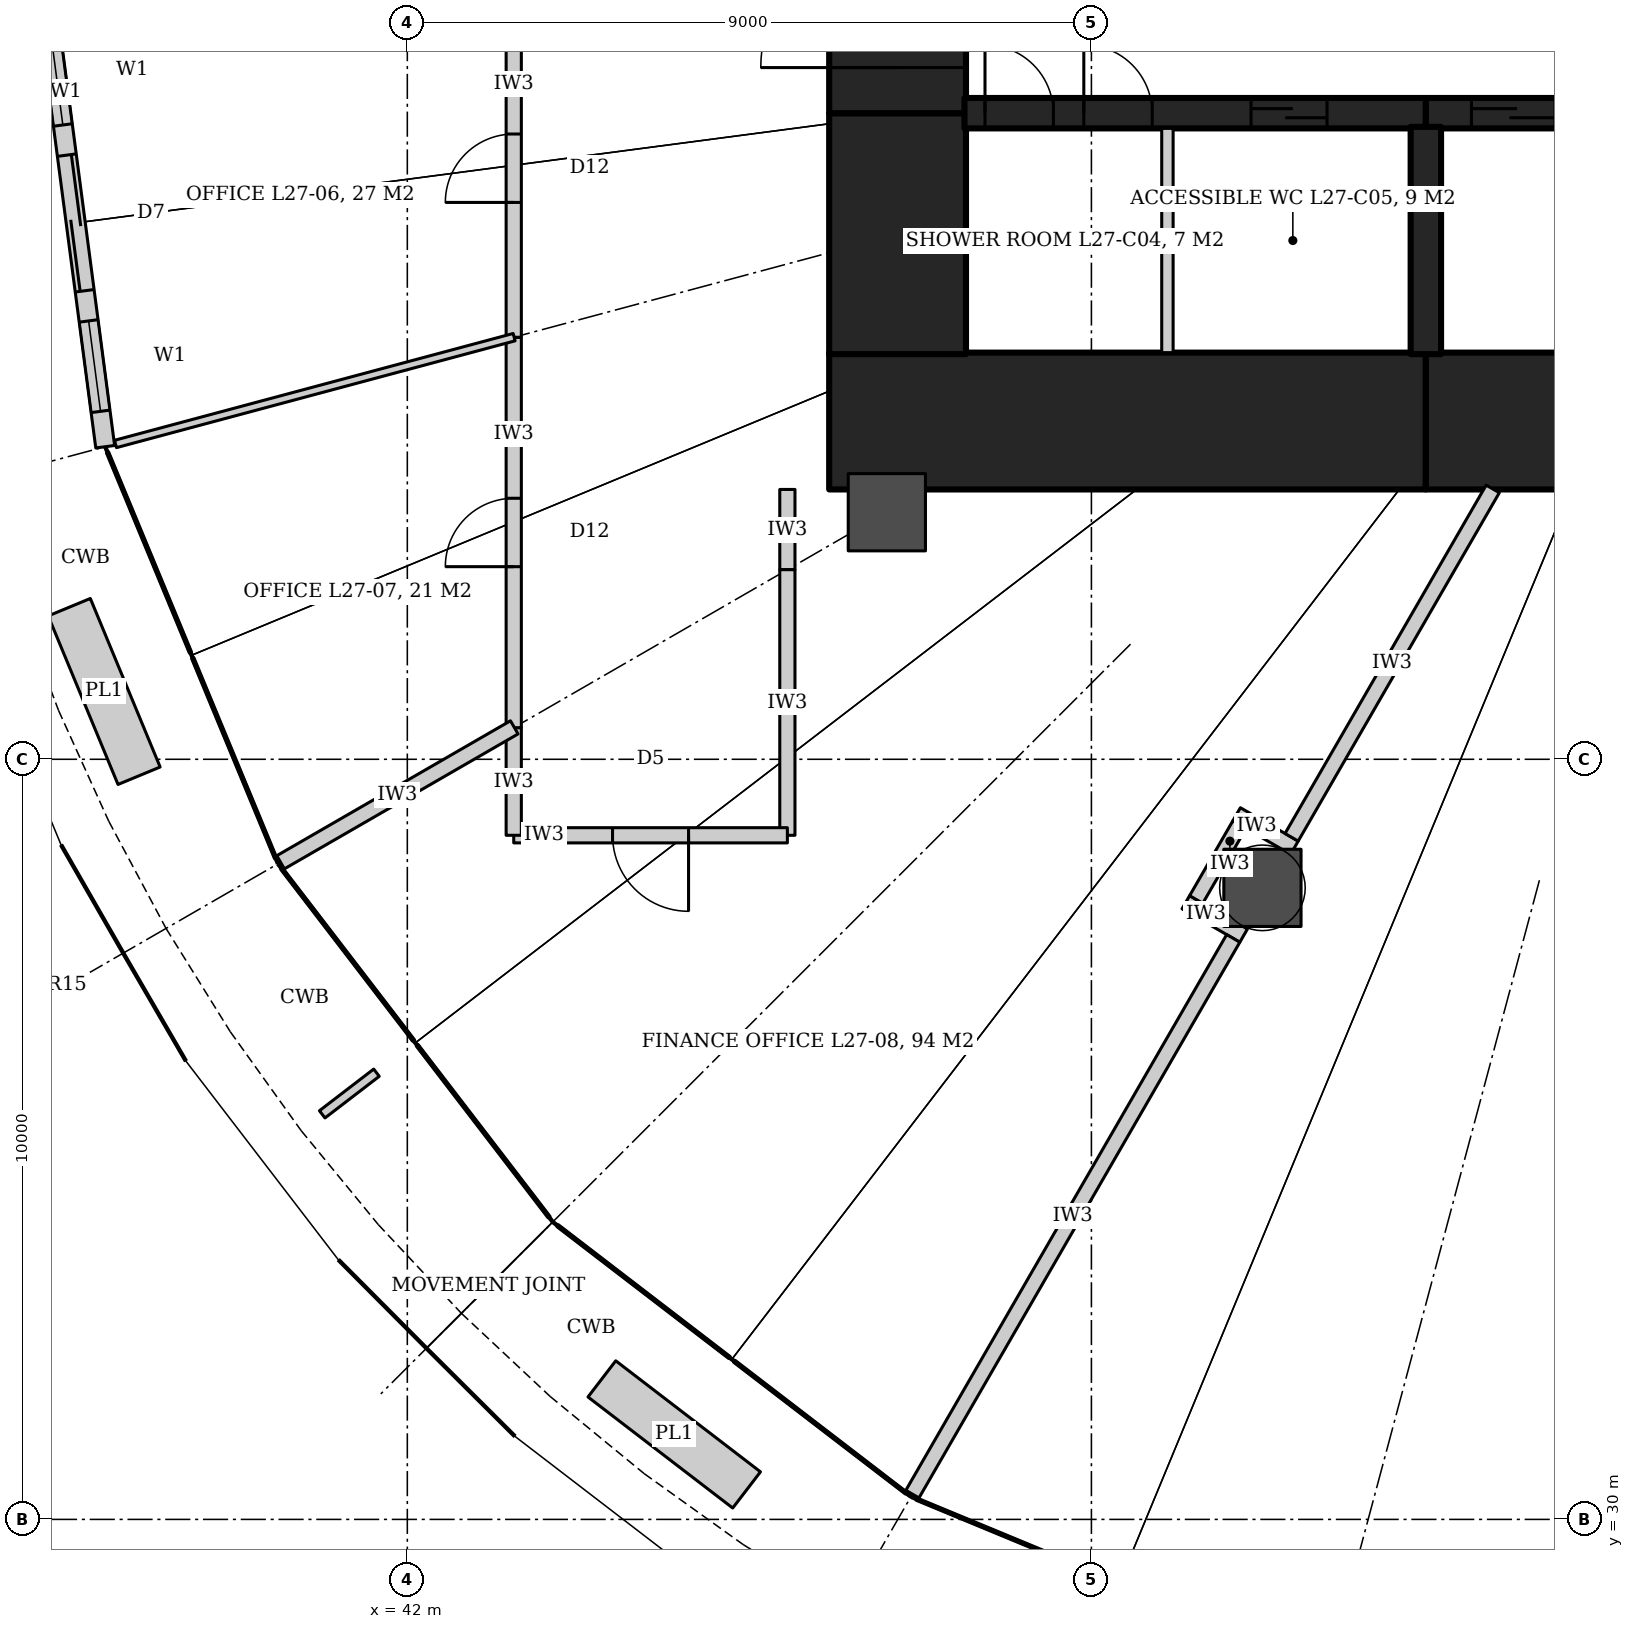
"""IFC4 building model, lengths in metres.
Left out: names, types, materials, properties, quantities, classifications, styles, units other than length and angle.
Written with IfcOpenShell. Run it as: python <this file> out.ifc"""

import sys

from ifc_helpers import new_model, si_unit, direction, frame, frame_2d, origin, origin_2d, place, context, subcontext, project, spatial, rectangle, hollow_circle, extrude, element, fill, save


model = new_model("IFC4")
c1 = context("Model", 3, precision=1e-05, world=origin(), true_north=direction((0.0, 1.0)))
c2 = subcontext(c1, "Body", "Model", "MODEL_VIEW")
j1 = project(units=[si_unit("LENGTHUNIT", "METRE"), si_unit("PLANEANGLEUNIT", "RADIAN")], contexts=[c1])
p1 = place(None, origin())
s1 = spatial("IfcSite", under=j1, at=p1, CompositionType="ELEMENT")
p2 = place(p1, origin())
s2 = spatial("IfcBuilding", under=s1, at=p2, CompositionType="ELEMENT")
p3 = place(p2, frame((0.0, 0.0, 122.6)))
s3 = spatial("IfcBuildingStorey", under=s2, at=p3, CompositionType="ELEMENT", Elevation=122.6)
p4 = place(p3, frame((47.55, 44.45, 0.0), z_axis=(0.0, 0.0, 1.0), x_axis=(1.0, 0.0, 0.0)))
e1 = element("IfcWall", 1, at=p4, inside=s3, PredefinedType="SHEAR", context=c2, shape_type="SweptSolid", body=[
    extrude(rectangle(XDim=7.85, YDim=1.8, at=frame_2d((3.925, 0.0))), origin(), (0.0, 0.0, 1.0), 4.2),
])
p5 = place(p3, frame((55.4, 44.45, 0.0), z_axis=(0.0, 0.0, 1.0), x_axis=(1.0, 0.0, 0.0)))
e2 = element("IfcWall", 2, at=p5, inside=s3, PredefinedType="SHEAR", context=c2, shape_type="SweptSolid", body=[
    extrude(rectangle(XDim=9.2, YDim=1.8, at=frame_2d((4.6, 0.0))), origin(), (0.0, 0.0, 1.0), 4.2),
])
p6 = place(p3, frame((48.45, 45.33, 0.0), z_axis=(0.0, 0.0, 1.0), x_axis=(0.0, 1.0, 0.0)))
e3 = element("IfcWall", 3, at=p6, inside=s3, PredefinedType="SHEAR", context=c2, shape_type="SweptSolid", body=[
    extrude(rectangle(XDim=3.17, YDim=1.8, at=frame_2d((1.585, 0.0))), origin(), (0.0, 0.0, 1.0), 4.2),
])
p7 = place(p3, frame((48.45, 48.5, 0.0), z_axis=(0.0, 0.0, 1.0), x_axis=(0.0, 1.0, 0.0)))
e4 = element("IfcWall", 4, at=p7, inside=s3, PredefinedType="SHEAR", context=c2, shape_type="SweptSolid", body=[
    extrude(rectangle(XDim=3.0, YDim=1.8, at=frame_2d((1.5, 0.0))), origin(), (0.0, 0.0, 1.0), 4.2),
])
p8 = place(p7, frame((0.6, 0.0, 0.0)))
e5 = element("IfcOpeningElement", 5, at=p8, cuts=e4, PredefinedType="OPENING", context=c2, shape_type="SweptSolid", body=[
    extrude(rectangle(XDim=1.8, YDim=2.1, at=frame_2d((0.9, 1.05))), frame((0.0, 0.91, 0.0), z_axis=(0.0, -1.0, 0.0), x_axis=(1.0, 0.0, 0.0)), (0.0, 0.0, 1.0), 1.82),
])
p9 = place(p3, frame((49.33, 48.5, 0.0), z_axis=(0.0, 0.0, 1.0), x_axis=(1.0, 0.0, 0.0)))
e6 = element("IfcWall", 6, at=p9, inside=s3, PredefinedType="SHEAR", context=c2, shape_type="SweptSolid", body=[
    extrude(rectangle(XDim=6.07, YDim=0.4, at=frame_2d((3.035, 0.0))), origin(), (0.0, 0.0, 1.0), 4.2),
])
p10 = place(p9, frame((0.27, 0.0, 0.0)))
e7 = element("IfcOpeningElement", 7, at=p10, cuts=e6, PredefinedType="OPENING", context=c2, shape_type="SweptSolid", body=[
    extrude(rectangle(XDim=0.9, YDim=2.1, at=frame_2d((0.45, 1.05))), frame((0.0, 0.21, 0.0), z_axis=(0.0, -1.0, 0.0), x_axis=(1.0, 0.0, 0.0)), (0.0, 0.0, 1.0), 0.42),
])
p11 = place(p9, frame((1.57, 0.0, 0.0)))
e8 = element("IfcOpeningElement", 8, at=p11, cuts=e6, PredefinedType="OPENING", context=c2, shape_type="SweptSolid", body=[
    extrude(rectangle(XDim=0.9, YDim=2.1, at=frame_2d((0.45, 1.05))), frame((0.0, 0.21, 0.0), z_axis=(0.0, -1.0, 0.0), x_axis=(1.0, 0.0, 0.0)), (0.0, 0.0, 1.0), 0.42),
])
p12 = place(p9, frame((3.77, 0.0, 0.0)))
e9 = element("IfcOpeningElement", 9, at=p12, cuts=e6, PredefinedType="OPENING", context=c2, shape_type="SweptSolid", body=[
    extrude(rectangle(XDim=1.0, YDim=2.1, at=frame_2d((0.5, 1.05))), frame((0.0, 0.21, 0.0), z_axis=(0.0, -1.0, 0.0), x_axis=(1.0, 0.0, 0.0)), (0.0, 0.0, 1.0), 0.42),
])
p13 = place(p3, frame((55.4, 48.5, 0.0), z_axis=(0.0, 0.0, 1.0), x_axis=(1.0, 0.0, 0.0)))
e10 = element("IfcWall", 10, at=p13, inside=s3, PredefinedType="SHEAR", context=c2, shape_type="SweptSolid", body=[
    extrude(rectangle(XDim=9.2, YDim=0.4, at=frame_2d((4.6, 0.0))), origin(), (0.0, 0.0, 1.0), 4.2),
])
p14 = place(p13, frame((0.6, 0.0, 0.0)))
e11 = element("IfcOpeningElement", 11, at=p14, cuts=e10, PredefinedType="OPENING", context=c2, shape_type="SweptSolid", body=[
    extrude(rectangle(XDim=1.1, YDim=2.1, at=frame_2d((0.55, 1.05))), frame((0.0, 0.21, 0.0), z_axis=(0.0, -1.0, 0.0), x_axis=(1.0, 0.0, 0.0)), (0.0, 0.0, 1.0), 0.42),
])
p15 = place(p13, frame((2.9, 0.0, 0.0)))
e12 = element("IfcOpeningElement", 12, at=p15, cuts=e10, PredefinedType="OPENING", context=c2, shape_type="SweptSolid", body=[
    extrude(rectangle(XDim=1.1, YDim=2.1, at=frame_2d((0.55, 1.05))), frame((0.0, 0.21, 0.0), z_axis=(0.0, -1.0, 0.0), x_axis=(1.0, 0.0, 0.0)), (0.0, 0.0, 1.0), 0.42),
])
p16 = place(p13, frame((5.2, 0.0, 0.0)))
e13 = element("IfcOpeningElement", 13, at=p16, cuts=e10, PredefinedType="OPENING", context=c2, shape_type="SweptSolid", body=[
    extrude(rectangle(XDim=1.1, YDim=2.1, at=frame_2d((0.55, 1.05))), frame((0.0, 0.21, 0.0), z_axis=(0.0, -1.0, 0.0), x_axis=(1.0, 0.0, 0.0)), (0.0, 0.0, 1.0), 0.42),
])
p17 = place(p13, frame((7.5, 0.0, 0.0)))
e14 = element("IfcOpeningElement", 14, at=p17, cuts=e10, PredefinedType="OPENING", context=c2, shape_type="SweptSolid", body=[
    extrude(rectangle(XDim=1.1, YDim=2.1, at=frame_2d((0.55, 1.05))), frame((0.0, 0.21, 0.0), z_axis=(0.0, -1.0, 0.0), x_axis=(1.0, 0.0, 0.0)), (0.0, 0.0, 1.0), 0.42),
])
p18 = place(p3, frame((55.4, 48.32, 0.0), z_axis=(0.0, 0.0, 1.0), x_axis=(0.0, -1.0, 0.0)))
e15 = element("IfcWall", 15, at=p18, inside=s3, PredefinedType="SHEAR", context=c2, shape_type="SweptSolid", body=[
    extrude(rectangle(XDim=2.99, YDim=0.4, at=frame_2d((1.495, 0.0))), origin(), (0.0, 0.0, 1.0), 4.2),
])
for number, where, z_axis, x_axis in (
    (16, (48.309, 43.25, 0.0), (0.0, 0.0, 1.0), (1.0, 0.0, 0.0)),
    (17, (53.25, 38.309, 0.0), (0.0, 0.0, 1.0), (1.0, 0.0, 0.0)),
):
    element("IfcColumn", number, at=place(p3, frame(where, z_axis=z_axis, x_axis=x_axis)), inside=s3, PredefinedType="COLUMN", context=c2, shape_type="SweptSolid", body=[
        extrude(hollow_circle(Radius=0.508, WallThickness=0.05, at=origin_2d()), origin(), (0.0, 0.0, 1.0), 4.2),
    ])
p19 = place(p3, frame((47.0, 43.55, 0.0), z_axis=(0.0, 0.0, 1.0), x_axis=(0.0, -1.0, 0.0)))
e18 = element("IfcWall", 18, at=p19, inside=s3, PredefinedType="PARTITIONING", context=c2, shape_type="SweptSolid", body=[
    extrude(rectangle(XDim=1.056, YDim=0.2, at=frame_2d((0.528, 0.0))), origin(), (0.0, 0.0, 1.0), 3.04),
])
p20 = place(p3, frame((47.0, 42.494, 0.0), z_axis=(0.0, 0.0, 1.0), x_axis=(0.0, -1.0, 0.0)))
e19 = element("IfcWall", 19, at=p20, inside=s3, PredefinedType="PARTITIONING", context=c2, shape_type="SweptSolid", body=[
    extrude(rectangle(XDim=3.494, YDim=0.2, at=frame_2d((1.747, 0.0))), origin(), (0.0, 0.0, 1.0), 3.04),
])
p21 = place(p3, frame((47.0, 39.0, 0.0), z_axis=(0.0, 0.0, 1.0), x_axis=(-1.0, 0.0, 0.0)))
e20 = element("IfcWall", 20, at=p21, inside=s3, PredefinedType="PARTITIONING", context=c2, shape_type="SweptSolid", body=[
    extrude(rectangle(XDim=3.6, YDim=0.2, at=frame_2d((1.8, 0.0))), origin(), (0.0, 0.0, 1.0), 3.04),
])
p22 = place(p21, frame((1.3, 0.0, 0.0)))
e21 = element("IfcOpeningElement", 21, at=p22, cuts=e20, PredefinedType="OPENING", context=c2, shape_type="SweptSolid", body=[
    extrude(rectangle(XDim=1.0, YDim=2.1, at=frame_2d((0.5, 1.05))), frame((0.0, 0.11, 0.0), z_axis=(0.0, -1.0, 0.0), x_axis=(1.0, 0.0, 0.0)), (0.0, 0.0, 1.0), 0.22),
])
p23 = place(p3, frame((43.4, 39.0, 0.0), z_axis=(0.0, 0.0, 1.0), x_axis=(0.0, 1.0, 0.0)))
e22 = element("IfcWall", 22, at=p23, inside=s3, PredefinedType="PARTITIONING", context=c2, shape_type="SweptSolid", body=[
    extrude(rectangle(XDim=1.416, YDim=0.2, at=frame_2d((0.708, 0.0))), origin(), (0.0, 0.0, 1.0), 3.04),
])
p24 = place(p3, frame((43.4, 40.416, 0.0), z_axis=(0.0, 0.0, 1.0), x_axis=(0.0, 1.0, 0.0)))
e23 = element("IfcWall", 23, at=p24, inside=s3, PredefinedType="PARTITIONING", context=c2, shape_type="SweptSolid", body=[
    extrude(rectangle(XDim=5.136, YDim=0.2, at=frame_2d((2.568, 0.0))), origin(), (0.0, 0.0, 1.0), 3.04),
])
p25 = place(p24, frame((2.118, 0.0, 0.0)))
e24 = element("IfcOpeningElement", 24, at=p25, cuts=e23, PredefinedType="OPENING", context=c2, shape_type="SweptSolid", body=[
    extrude(rectangle(XDim=0.9, YDim=2.4, at=frame_2d((0.45, 1.2))), frame((0.0, 0.11, 0.0), z_axis=(0.0, -1.0, 0.0), x_axis=(1.0, 0.0, 0.0)), (0.0, 0.0, 1.0), 0.22),
])
p26 = place(p3, frame((43.4, 45.552, 0.0), z_axis=(0.0, 0.0, 1.0), x_axis=(0.0, 1.0, 0.0)))
e25 = element("IfcWall", 25, at=p26, inside=s3, PredefinedType="PARTITIONING", context=c2, shape_type="SweptSolid", body=[
    extrude(rectangle(XDim=4.448, YDim=0.2, at=frame_2d((2.224, 0.0))), origin(), (0.0, 0.0, 1.0), 3.04),
])
p27 = place(p26, frame((1.774, 0.0, 0.0)))
e26 = element("IfcOpeningElement", 26, at=p27, cuts=e25, PredefinedType="OPENING", context=c2, shape_type="SweptSolid", body=[
    extrude(rectangle(XDim=0.9, YDim=2.4, at=frame_2d((0.45, 1.2))), frame((0.0, 0.11, 0.0), z_axis=(0.0, -1.0, 0.0), x_axis=(1.0, 0.0, 0.0)), (0.0, 0.0, 1.0), 0.22),
])
p28 = place(p3, frame((43.406, 45.553, 0.0), z_axis=(0.0, 0.0, 1.0), x_axis=(-0.965932799886, -0.258793017881, 0.0)))
e27 = element("IfcWall", 27, at=p28, inside=s3, PredefinedType="PARTITIONING", context=c2, shape_type="SweptSolid", body=[
    extrude(rectangle(XDim=5.43, YDim=0.1, at=frame_2d((2.715, 0.0))), origin(), (0.0, 0.0, 1.0), 3.04),
])
p29 = place(p3, frame((43.407, 40.42, 0.0), z_axis=(0.0, 0.0, 1.0), x_axis=(-0.8660424351, -0.499970499736, 0.0)))
e28 = element("IfcWall", 28, at=p29, inside=s3, PredefinedType="PARTITIONING", context=c2, shape_type="SweptSolid", body=[
    extrude(rectangle(XDim=3.55, YDim=0.2, at=frame_2d((1.775, 0.0))), origin(), (0.0, 0.0, 1.0), 3.04),
])
for number, where, z_axis, x_axis in (
    (29, (53.671, 38.837, 0.0), (0.0, 0.0, 1.0), (-0.866, 0.5, 0.0)),
    (30, (53.003, 37.68, 0.0), (0.0, 0.0, 1.0), (-0.866, 0.5, 0.0)),
):
    element("IfcWall", number, at=place(p3, frame(where, z_axis=z_axis, x_axis=x_axis)), inside=s3, PredefinedType="PARTITIONING", context=c2, shape_type="SweptSolid", body=[
        extrude(rectangle(XDim=0.878, YDim=0.2, at=frame_2d((0.439, 0.0))), origin(), (0.0, 0.0, 1.0), 3.02),
    ])
p30 = place(p3, frame((52.947, 39.14, 0.0), z_axis=(0.0, 0.0, 1.0), x_axis=(-0.499883687939, -0.866092546171, 0.0)))
e31 = element("IfcWall", 31, at=p30, inside=s3, PredefinedType="PARTITIONING", context=c2, shape_type="SweptSolid", body=[
    extrude(rectangle(XDim=1.136, YDim=0.2, at=frame_2d((0.568, 0.0))), origin(), (0.0, 0.0, 1.0), 3.02),
])
p31 = place(p3, frame((56.28, 43.557, 0.0), z_axis=(0.0, 0.0, 1.0), x_axis=(-0.49999933383, -0.866025788398, 0.0)))
e32 = element("IfcWall", 32, at=p31, inside=s3, PredefinedType="PARTITIONING", context=c2, shape_type="SweptSolid", body=[
    extrude(rectangle(XDim=5.292, YDim=0.2, at=frame_2d((2.646, 0.0))), origin(), (0.0, 0.0, 1.0), 3.04),
])
p32 = place(p3, frame((52.866, 37.644, 0.0), z_axis=(0.0, 0.0, 1.0), x_axis=(-0.49999281717, -0.866029550753, 0.0)))
e33 = element("IfcWall", 33, at=p32, inside=s3, PredefinedType="PARTITIONING", context=c2, shape_type="SweptSolid", body=[
    extrude(rectangle(XDim=8.442, YDim=0.2, at=frame_2d((4.221, 0.0))), origin(), (0.0, 0.0, 1.0), 3.04),
])
p33 = place(p3, frame((37.25, 50.0, 0.0), z_axis=(0.0, 0.0, 1.0), x_axis=(0.130518315254, -0.991445898364, 0.0)))
e34 = element("IfcWall", 34, at=p33, inside=s3, PredefinedType="SOLIDWALL", context=c2, shape_type="SweptSolid", body=[
    extrude(rectangle(XDim=5.939, YDim=0.25, at=frame_2d((2.969, 0.0))), origin(), (0.0, 0.0, 1.0), 4.04),
])
p34 = place(p33, frame((2.07, 0.0, 0.0)))
e35 = element("IfcOpeningElement", 35, at=p34, cuts=e34, PredefinedType="OPENING", context=c2, shape_type="SweptSolid", body=[
    extrude(rectangle(XDim=1.8, YDim=2.4, at=frame_2d((0.9, 1.2))), frame((0.0, 0.135, 0.0), z_axis=(0.0, -1.0, 0.0), x_axis=(1.0, 0.0, 0.0)), (0.0, 0.0, 1.0), 0.27),
])
p35 = place(p33, frame((0.469, 0.0, 0.0)))
e36 = element("IfcOpeningElement", 36, at=p35, cuts=e34, PredefinedType="OPENING", context=c2, shape_type="SweptSolid", body=[
    extrude(rectangle(XDim=1.2, YDim=2.4, at=frame_2d((0.6, 1.2))), frame((0.0, 0.135, 0.0), z_axis=(0.0, -1.0, 0.0), x_axis=(1.0, 0.0, 0.0)), (0.0, 0.0, 1.0), 0.27),
])
p36 = place(p33, frame((4.27, 0.0, 0.0)))
e37 = element("IfcOpeningElement", 37, at=p36, cuts=e34, PredefinedType="OPENING", context=c2, shape_type="SweptSolid", body=[
    extrude(rectangle(XDim=1.2, YDim=2.4, at=frame_2d((0.6, 1.2))), frame((0.0, 0.135, 0.0), z_axis=(0.0, -1.0, 0.0), x_axis=(1.0, 0.0, 0.0)), (0.0, 0.0, 1.0), 0.27),
])
p37 = place(p3, frame((52.0, 45.35, 0.0), z_axis=(0.0, 0.0, 1.0), x_axis=(0.0, 1.0, 0.0)))
e38 = element("IfcWall", 38, at=p37, inside=s3, PredefinedType="PARTITIONING", context=c2, shape_type="SweptSolid", body=[
    extrude(rectangle(XDim=2.95, YDim=0.15, at=frame_2d((1.475, 0.0))), origin(), (0.0, 0.0, 1.0), 4.04),
])
p38 = place(p27, origin())
e39 = element("IfcDoor", 39, at=p38, inside=s3, OperationType="SINGLE_SWING_LEFT", PredefinedType="DOOR", context=c2, shape_type="SweptSolid", body=[
    extrude(rectangle(XDim=0.9, YDim=2.4, at=frame_2d((0.45, 1.2))), frame((0.0, 0.025, 0.0), z_axis=(0.0, -1.0, 0.0), x_axis=(1.0, 0.0, 0.0)), (0.0, 0.0, 1.0), 0.05),
])
fill(e26, e39)
p39 = place(p25, origin())
e40 = element("IfcDoor", 40, at=p39, inside=s3, OperationType="SINGLE_SWING_LEFT", PredefinedType="DOOR", context=c2, shape_type="SweptSolid", body=[
    extrude(rectangle(XDim=0.9, YDim=2.4, at=frame_2d((0.45, 1.2))), frame((0.0, 0.025, 0.0), z_axis=(0.0, -1.0, 0.0), x_axis=(1.0, 0.0, 0.0)), (0.0, 0.0, 1.0), 0.05),
])
fill(e24, e40)
p40 = place(p22, origin())
e41 = element("IfcDoor", 41, at=p40, inside=s3, OperationType="SINGLE_SWING_LEFT", PredefinedType="DOOR", context=c2, shape_type="SweptSolid", body=[
    extrude(rectangle(XDim=1.0, YDim=2.1, at=frame_2d((0.5, 1.05))), frame((0.0, 0.025, 0.0), z_axis=(0.0, -1.0, 0.0), x_axis=(1.0, 0.0, 0.0)), (0.0, 0.0, 1.0), 0.05),
])
fill(e21, e41)
p41 = place(p34, origin())
e42 = element("IfcDoor", 42, at=p41, inside=s3, OperationType="DOUBLE_DOOR_SLIDING", PredefinedType="DOOR", context=c2, shape_type="SweptSolid", body=[
    extrude(rectangle(XDim=1.8, YDim=2.4, at=frame_2d((0.9, 1.2))), frame((0.0, 0.025, 0.0), z_axis=(0.0, -1.0, 0.0), x_axis=(1.0, 0.0, 0.0)), (0.0, 0.0, 1.0), 0.05),
])
fill(e35, e42)
p42 = place(p35, origin())
e43 = element("IfcWindow", 43, at=p42, inside=s3, PartitioningType="SINGLE_PANEL", PredefinedType="WINDOW", context=c2, shape_type="SweptSolid", body=[
    extrude(rectangle(XDim=1.2, YDim=2.4, at=frame_2d((0.6, 1.2))), frame((0.0, 0.03, 0.0), z_axis=(0.0, -1.0, 0.0), x_axis=(1.0, 0.0, 0.0)), (0.0, 0.0, 1.0), 0.06),
])
fill(e36, e43)
p43 = place(p36, origin())
e44 = element("IfcWindow", 44, at=p43, inside=s3, PartitioningType="SINGLE_PANEL", PredefinedType="WINDOW", context=c2, shape_type="SweptSolid", body=[
    extrude(rectangle(XDim=1.2, YDim=2.4, at=frame_2d((0.6, 1.2))), frame((0.0, 0.03, 0.0), z_axis=(0.0, -1.0, 0.0), x_axis=(1.0, 0.0, 0.0)), (0.0, 0.0, 1.0), 0.06),
])
fill(e37, e44)
p44 = place(p14, origin())
e45 = element("IfcDoor", 45, at=p44, inside=s3, OperationType="SLIDING_TO_LEFT", PredefinedType="DOOR", context=c2, shape_type="SweptSolid", body=[
    extrude(rectangle(XDim=1.1, YDim=2.1, at=frame_2d((0.55, 1.05))), frame((0.0, 0.025, 0.0), z_axis=(0.0, -1.0, 0.0), x_axis=(1.0, 0.0, 0.0)), (0.0, 0.0, 1.0), 0.05),
])
fill(e11, e45)
p45 = place(p10, origin())
e46 = element("IfcDoor", 46, at=p45, inside=s3, OperationType="SINGLE_SWING_RIGHT", PredefinedType="DOOR", context=c2, shape_type="SweptSolid", body=[
    extrude(rectangle(XDim=0.9, YDim=2.1, at=frame_2d((0.45, 1.05))), frame((0.0, 0.025, 0.0), z_axis=(0.0, -1.0, 0.0), x_axis=(1.0, 0.0, 0.0)), (0.0, 0.0, 1.0), 0.05),
])
fill(e7, e46)
p46 = place(p11, origin())
e47 = element("IfcDoor", 47, at=p46, inside=s3, OperationType="SINGLE_SWING_RIGHT", PredefinedType="DOOR", context=c2, shape_type="SweptSolid", body=[
    extrude(rectangle(XDim=0.9, YDim=2.1, at=frame_2d((0.45, 1.05))), frame((0.0, 0.025, 0.0), z_axis=(0.0, -1.0, 0.0), x_axis=(1.0, 0.0, 0.0)), (0.0, 0.0, 1.0), 0.05),
])
fill(e8, e47)
p47 = place(p12, origin())
e48 = element("IfcDoor", 48, at=p47, inside=s3, OperationType="SLIDING_TO_LEFT", PredefinedType="DOOR", context=c2, shape_type="SweptSolid", body=[
    extrude(rectangle(XDim=1.0, YDim=2.1, at=frame_2d((0.5, 1.05))), frame((0.0, 0.025, 0.0), z_axis=(0.0, -1.0, 0.0), x_axis=(1.0, 0.0, 0.0)), (0.0, 0.0, 1.0), 0.05),
])
fill(e9, e48)
p48 = place(p8, origin())
e49 = element("IfcDoor", 49, at=p48, inside=s3, OperationType="DOUBLE_DOOR_DOUBLE_SWING", PredefinedType="DOOR", context=c2, shape_type="SweptSolid", body=[
    extrude(rectangle(XDim=1.8, YDim=2.1, at=frame_2d((0.9, 1.05))), frame((0.0, 0.025, 0.0), z_axis=(0.0, -1.0, 0.0), x_axis=(1.0, 0.0, 0.0)), (0.0, 0.0, 1.0), 0.05),
])
fill(e5, e49)
save(model, sys.argv[1])
